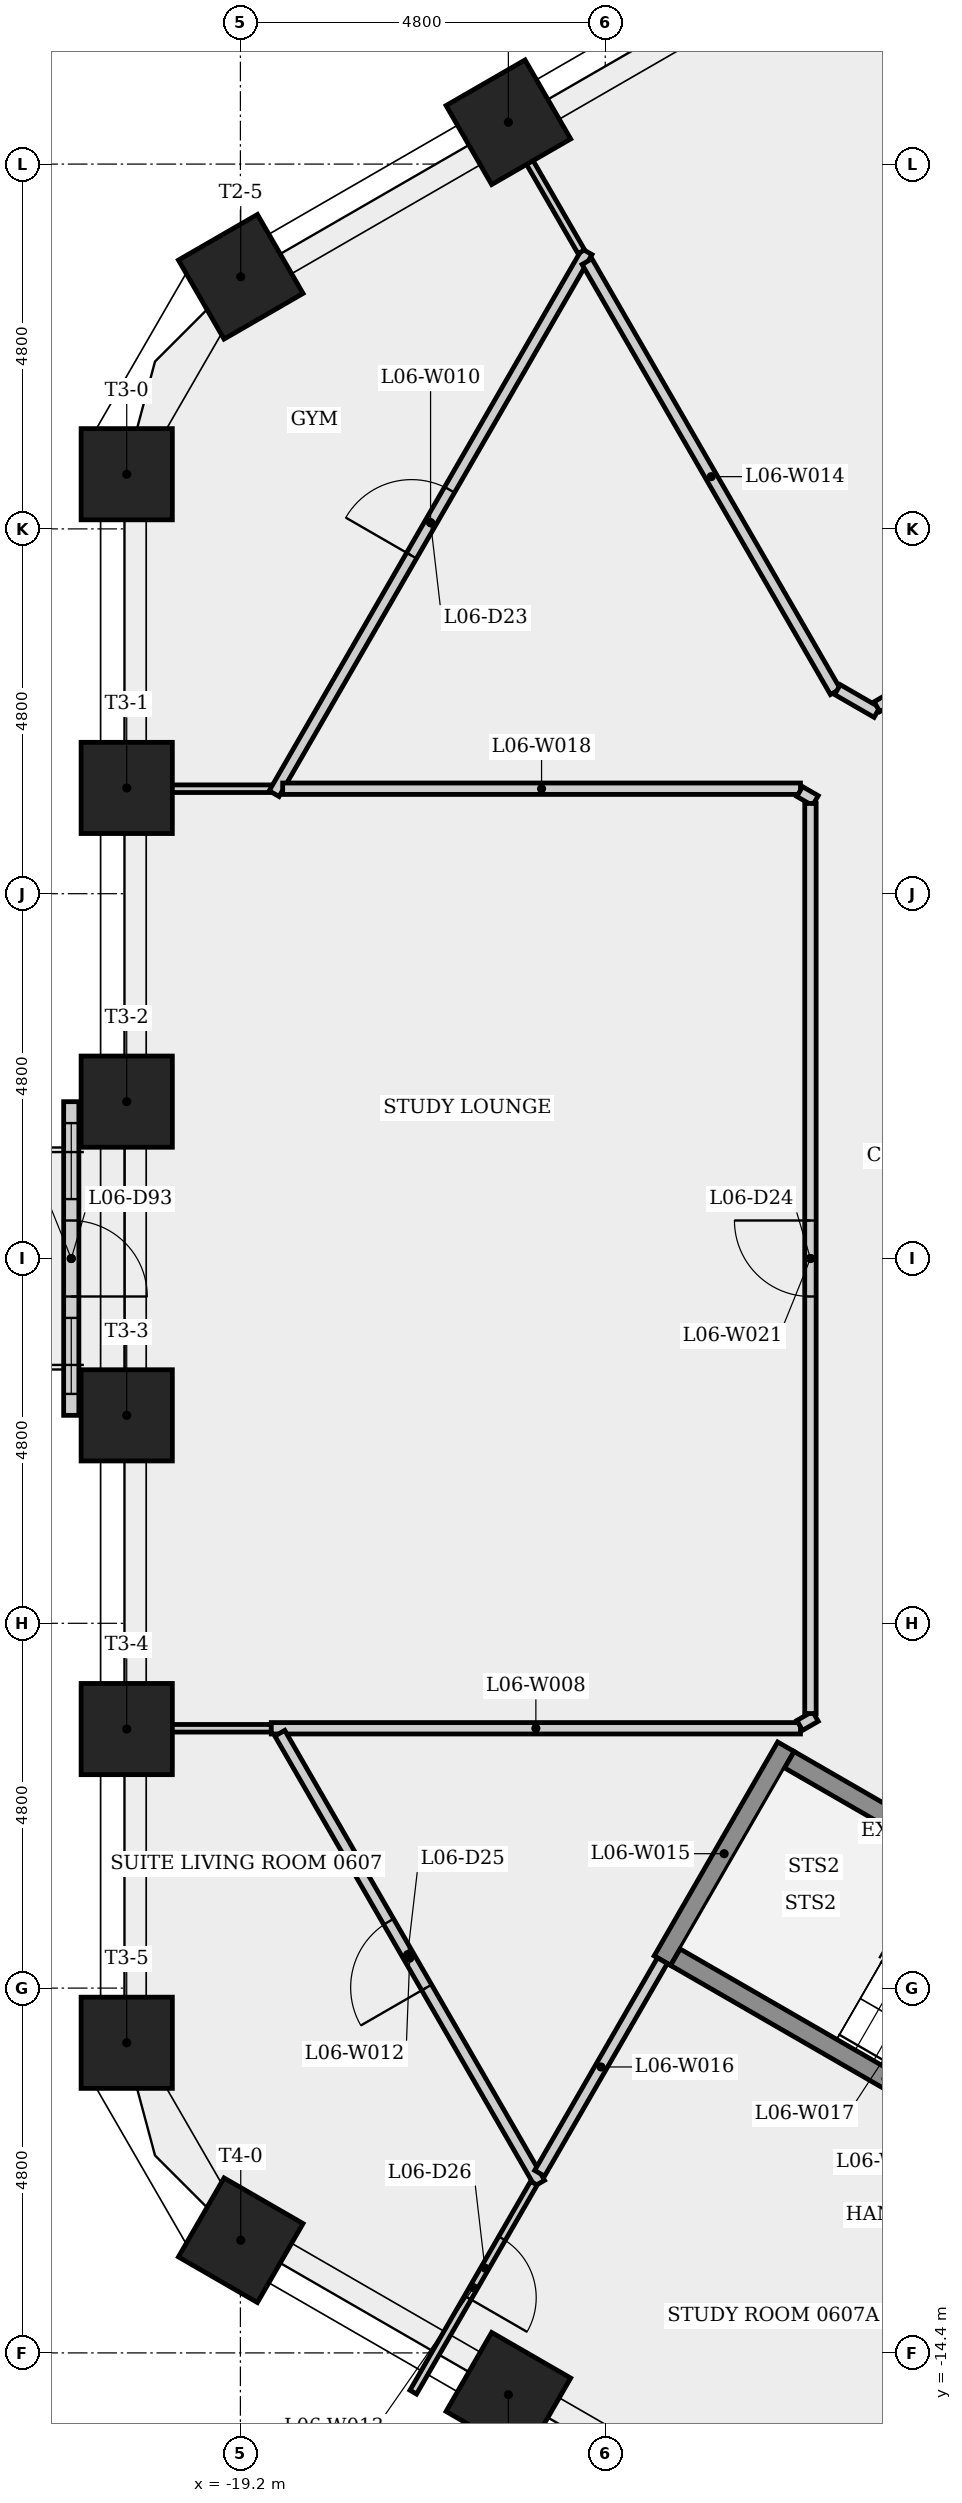
"""IFC4 building model, lengths in metres.
Left out: names, types, materials, properties, quantities, classifications, styles, units other than length and angle.
Written with IfcOpenShell. Run it as: python <this file> out.ifc"""

import sys

from ifc_helpers import new_model, si_unit, direction, frame, frame_2d, origin, origin_2d, place, context, subcontext, project, spatial, rectangle, extrude, element, fill, save


model = new_model("IFC4")
c1 = context("Model", 3, precision=1e-05, world=origin(), true_north=direction((0.0, 1.0)))
c2 = subcontext(c1, "Body", "Model", "MODEL_VIEW")
j1 = project(units=[si_unit("LENGTHUNIT", "METRE"), si_unit("PLANEANGLEUNIT", "RADIAN")], contexts=[c1])
p1 = place(None, origin())
s1 = spatial("IfcSite", under=j1, at=p1, CompositionType="ELEMENT")
p2 = place(p1, origin())
s2 = spatial("IfcBuilding", under=s1, at=p2, CompositionType="ELEMENT")
p3 = place(p2, frame((0.0, 0.0, 28.9)))
s3 = spatial("IfcBuildingStorey", under=s2, at=p3, CompositionType="ELEMENT", Elevation=28.9)
for number, where, z_axis, x_axis in (
    (1, (-15.674, 14.95, 0.0), (0.0, 0.0, 1.0), (-0.5, 0.866, 0.0)),
    (2, (-19.196, 12.917, 0.0), (0.0, 0.0, 1.0), (-0.5, 0.866, 0.0)),
    (3, (-20.696, 10.319, 0.0), (0.0, 0.0, 1.0), (-1.0, 0.0, 0.0)),
    (4, (-20.696, 6.192, 0.0), (0.0, 0.0, 1.0), (-1.0, 0.0, 0.0)),
    (5, (-20.696, 2.064, 0.0), (0.0, 0.0, 1.0), (-1.0, 0.0, 0.0)),
    (6, (-20.696, -2.064, 0.0), (0.0, 0.0, 1.0), (-1.0, 0.0, 0.0)),
    (7, (-20.696, -6.192, 0.0), (0.0, 0.0, 1.0), (-1.0, 0.0, 0.0)),
    (8, (-20.696, -10.319, 0.0), (0.0, 0.0, 1.0), (-1.0, 0.0, 0.0)),
    (9, (-19.196, -12.917, 0.0), (0.0, 0.0, 1.0), (-0.5, -0.866, 0.0)),
    (10, (-15.674, -14.95, 0.0), (0.0, 0.0, 1.0), (-0.5, -0.866, 0.0)),
):
    element("IfcColumn", number, at=place(p3, frame(where, z_axis=z_axis, x_axis=x_axis)), inside=s3, PredefinedType="COLUMN", context=c2, shape_type="SweptSolid", body=[
        extrude(rectangle(XDim=1.2, YDim=1.2, at=origin_2d()), origin(), (0.0, 0.0, 1.0), 3.4),
    ])
p4 = place(p3, frame((-21.425, 2.063, 0.0), z_axis=(0.0, 0.0, 1.0), x_axis=(0.0, -1.0, 0.0)))
e11 = element("IfcWall", 11, at=p4, inside=s3, PredefinedType="SOLIDWALL", context=c2, shape_type="SweptSolid", body=[
    extrude(rectangle(XDim=4.127, YDim=0.2, at=frame_2d((2.063, 0.0))), origin(), (0.0, 0.0, 1.0), 3.4),
])
p5 = place(p4, frame((1.563, 0.0, 0.0)))
e12 = element("IfcOpeningElement", 12, at=p5, cuts=e11, PredefinedType="OPENING", context=c2, shape_type="SweptSolid", body=[
    extrude(rectangle(XDim=1.0, YDim=2.4, at=frame_2d((0.5, 1.2))), frame((0.0, 0.11, 0.0), z_axis=(0.0, -1.0, 0.0), x_axis=(1.0, 0.0, 0.0)), (0.0, 0.0, 1.0), 0.22),
])
p6 = place(p4, frame((0.282, 0.0, 0.9)))
e13 = element("IfcOpeningElement", 13, at=p6, cuts=e11, PredefinedType="OPENING", context=c2, shape_type="SweptSolid", body=[
    extrude(rectangle(XDim=1.0, YDim=1.5, at=frame_2d((0.5, 0.75))), frame((0.0, 0.11, 0.0), z_axis=(0.0, -1.0, 0.0), x_axis=(1.0, 0.0, 0.0)), (0.0, 0.0, 1.0), 0.22),
])
p7 = place(p4, frame((2.845, 0.0, 0.9)))
e14 = element("IfcOpeningElement", 14, at=p7, cuts=e11, PredefinedType="OPENING", context=c2, shape_type="SweptSolid", body=[
    extrude(rectangle(XDim=1.0, YDim=1.5, at=frame_2d((0.5, 0.75))), frame((0.0, 0.11, 0.0), z_axis=(0.0, -1.0, 0.0), x_axis=(1.0, 0.0, 0.0)), (0.0, 0.0, 1.0), 0.22),
])
p8 = place(p3, frame((-18.794, -6.181, 0.0), z_axis=(0.0, 0.0, 1.0), x_axis=(-1.0, 0.0, 0.0)))
e15 = element("IfcWall", 15, at=p8, inside=s3, PredefinedType="PARTITIONING", context=c2, shape_type="SweptSolid", body=[
    extrude(rectangle(XDim=1.932, YDim=0.1, at=frame_2d((0.966, 0.0))), origin(), (0.0, 0.0, 1.0), 3.05),
])
p9 = place(p3, frame((-18.794, -6.181, 0.0), z_axis=(0.0, 0.0, 1.0), x_axis=(1.0, 0.0, 0.0)))
e16 = element("IfcWall", 16, at=p9, inside=s3, PredefinedType="PARTITIONING", context=c2, shape_type="SweptSolid", body=[
    extrude(rectangle(XDim=6.962, YDim=0.15, at=frame_2d((3.481, 0.0))), origin(), (0.0, 0.0, 1.0), 3.05),
])
p10 = place(p3, frame((-18.794, 6.181, 0.0), z_axis=(0.0, 0.0, 1.0), x_axis=(-1.0, 0.0, 0.0)))
e17 = element("IfcWall", 17, at=p10, inside=s3, PredefinedType="PARTITIONING", context=c2, shape_type="SweptSolid", body=[
    extrude(rectangle(XDim=1.932, YDim=0.1, at=frame_2d((0.966, 0.0))), origin(), (0.0, 0.0, 1.0), 3.05),
])
p11 = place(p3, frame((-18.756, 6.116, 0.0), z_axis=(0.0, 0.0, 1.0), x_axis=(0.500020193662, 0.866013744654, 0.0)))
e18 = element("IfcWall", 18, at=p11, inside=s3, PredefinedType="PARTITIONING", context=c2, shape_type="SweptSolid", body=[
    extrude(rectangle(XDim=8.234, YDim=0.15, at=frame_2d((4.117, 0.0))), origin(), (0.0, 0.0, 1.0), 3.05),
])
p12 = place(p11, frame((3.617, 0.0, 0.0)))
e19 = element("IfcOpeningElement", 19, at=p12, cuts=e18, PredefinedType="OPENING", context=c2, shape_type="SweptSolid", body=[
    extrude(rectangle(XDim=1.0, YDim=2.1, at=frame_2d((0.5, 1.05))), frame((0.0, 0.085, 0.0), z_axis=(0.0, -1.0, 0.0), x_axis=(1.0, 0.0, 0.0)), (0.0, 0.0, 1.0), 0.17),
])
p13 = place(p3, frame((-15.692, 14.94, 0.0), z_axis=(0.0, 0.0, 1.0), x_axis=(0.499953038101, -0.866052515552, 0.0)))
e20 = element("IfcWall", 20, at=p13, inside=s3, PredefinedType="PARTITIONING", context=c2, shape_type="SweptSolid", body=[
    extrude(rectangle(XDim=1.955, YDim=0.1, at=frame_2d((0.978, 0.0))), origin(), (0.0, 0.0, 1.0), 3.05),
])
p14 = place(p3, frame((-15.263, -12.167, 0.0), z_axis=(0.0, 0.0, 1.0), x_axis=(-0.500022320372, 0.866012516728, 0.0)))
e21 = element("IfcWall", 21, at=p14, inside=s3, PredefinedType="PARTITIONING", context=c2, shape_type="SweptSolid", body=[
    extrude(rectangle(XDim=6.836, YDim=0.15, at=frame_2d((3.418, 0.0))), origin(), (0.0, 0.0, 1.0), 3.05),
])
p15 = place(p14, frame((2.973, 0.0, 0.0)))
e22 = element("IfcOpeningElement", 22, at=p15, cuts=e21, PredefinedType="OPENING", context=c2, shape_type="SweptSolid", body=[
    extrude(rectangle(XDim=1.0, YDim=2.1, at=frame_2d((0.5, 1.05))), frame((0.0, 0.085, 0.0), z_axis=(0.0, -1.0, 0.0), x_axis=(1.0, 0.0, 0.0)), (0.0, 0.0, 1.0), 0.17),
])
p16 = place(p3, frame((-15.338, -12.167, 0.0), z_axis=(0.0, 0.0, 1.0), x_axis=(-0.500017526161, -0.866015284814, 0.0)))
e23 = element("IfcWall", 23, at=p16, inside=s3, PredefinedType="PARTITIONING", context=c2, shape_type="SweptSolid", body=[
    extrude(rectangle(XDim=3.175, YDim=0.1, at=frame_2d((1.588, 0.0))), origin(), (0.0, 0.0, 1.0), 3.05),
])
p17 = place(p16, frame((0.84, 0.0, 0.0)))
e24 = element("IfcOpeningElement", 24, at=p17, cuts=e23, PredefinedType="OPENING", context=c2, shape_type="SweptSolid", body=[
    extrude(rectangle(XDim=0.9, YDim=2.1, at=frame_2d((0.45, 1.05))), frame((0.0, 0.06, 0.0), z_axis=(0.0, -1.0, 0.0), x_axis=(1.0, 0.0, 0.0)), (0.0, 0.0, 1.0), 0.12),
])
p18 = place(p3, frame((-14.639, 13.117, 0.0), z_axis=(0.0, 0.0, 1.0), x_axis=(0.500000581714, -0.866025067932, 0.0)))
e25 = element("IfcWall", 25, at=p18, inside=s3, PredefinedType="PARTITIONING", context=c2, shape_type="SweptSolid", body=[
    extrude(rectangle(XDim=6.535, YDim=0.15, at=frame_2d((3.267, 0.0))), origin(), (0.0, 0.0, 1.0), 3.05),
])
p19 = place(p3, frame((-13.648, -9.239, 0.0), z_axis=(0.0, 0.0, 1.0), x_axis=(0.500017246033, 0.866015446554, 0.0)))
e26 = element("IfcWall", 26, at=p19, inside=s3, PredefinedType="SHEAR", context=c2, shape_type="SweptSolid", body=[
    extrude(rectangle(XDim=3.25, YDim=0.25, at=frame_2d((1.625, 0.0))), origin(), (0.0, 0.0, 1.0), 3.05),
])
p20 = place(p3, frame((-13.648, -9.239, 0.0), z_axis=(0.0, 0.0, 1.0), x_axis=(-0.500032073372, -0.866006885423, 0.0)))
e27 = element("IfcWall", 27, at=p20, inside=s3, PredefinedType="PARTITIONING", context=c2, shape_type="SweptSolid", body=[
    extrude(rectangle(XDim=3.231, YDim=0.15, at=frame_2d((1.615, 0.0))), origin(), (0.0, 0.0, 1.0), 3.05),
])
p21 = place(p3, frame((-11.977, -6.595, 0.0), z_axis=(0.0, 0.0, 1.0), x_axis=(0.866025499775, -0.499999833739, 0.0)))
e28 = element("IfcWall", 28, at=p21, inside=s3, PredefinedType="SHEAR", context=c2, shape_type="SweptSolid", body=[
    extrude(rectangle(XDim=6.4, YDim=0.25, at=frame_2d((3.2, 0.0))), origin(), (0.0, 0.0, 1.0), 3.05),
])
p22 = place(p21, frame((5.025, 0.0, 0.0)))
e29 = element("IfcOpeningElement", 29, at=p22, cuts=e28, PredefinedType="OPENING", context=c2, shape_type="SweptSolid", body=[
    extrude(rectangle(XDim=1.0, YDim=2.1, at=frame_2d((0.5, 1.05))), frame((0.0, 0.135, 0.0), z_axis=(0.0, -1.0, 0.0), x_axis=(1.0, 0.0, 0.0)), (0.0, 0.0, 1.0), 0.27),
])
p23 = place(p3, frame((-11.831, 6.181, 0.0), z_axis=(0.0, 0.0, 1.0), x_axis=(-1.0, 0.0, 0.0)))
e30 = element("IfcWall", 30, at=p23, inside=s3, PredefinedType="PARTITIONING", context=c2, shape_type="SweptSolid", body=[
    extrude(rectangle(XDim=6.812, YDim=0.15, at=frame_2d((3.406, 0.0))), origin(), (0.0, 0.0, 1.0), 3.05),
])
for number, where, z_axis, x_axis in (
    (31, (-11.841, -6.144, 0.0), (0.0, 0.0, 1.0), (0.866, 0.5, 0.0)),
    (32, (-11.635, 6.025, 0.0), (0.0, 0.0, 1.0), (-0.866, 0.5, 0.0)),
):
    element("IfcWall", number, at=place(p3, frame(where, z_axis=z_axis, x_axis=x_axis)), inside=s3, PredefinedType="PARTITIONING", context=c2, shape_type="SweptSolid", body=[
        extrude(rectangle(XDim=0.238, YDim=0.15, at=frame_2d((0.119, 0.0))), origin(), (0.0, 0.0, 1.0), 3.05),
    ])
p24 = place(p3, frame((-11.7, -5.987, 0.0), z_axis=(0.0, 0.0, 1.0), x_axis=(0.0, 1.0, 0.0)))
e33 = element("IfcWall", 33, at=p24, inside=s3, PredefinedType="PARTITIONING", context=c2, shape_type="SweptSolid", body=[
    extrude(rectangle(XDim=11.975, YDim=0.15, at=frame_2d((5.987, 0.0))), origin(), (0.0, 0.0, 1.0), 3.05),
])
p25 = place(p24, frame((5.487, 0.0, 0.0)))
e34 = element("IfcOpeningElement", 34, at=p25, cuts=e33, PredefinedType="OPENING", context=c2, shape_type="SweptSolid", body=[
    extrude(rectangle(XDim=1.0, YDim=2.1, at=frame_2d((0.5, 1.05))), frame((0.0, 0.085, 0.0), z_axis=(0.0, -1.0, 0.0), x_axis=(1.0, 0.0, 0.0)), (0.0, 0.0, 1.0), 0.17),
])
p26 = place(p3, frame((-11.344, 7.485, 0.0), z_axis=(0.0, 0.0, 1.0), x_axis=(0.866131372301, -0.499816412211, 0.0)))
e35 = element("IfcWall", 35, at=p26, inside=s3, PredefinedType="PARTITIONING", context=c2, shape_type="SweptSolid", body=[
    extrude(rectangle(XDim=0.6, YDim=0.15, at=frame_2d((0.3, 0.0))), origin(), (0.0, 0.0, 1.0), 3.05),
])
p27 = place(p3, frame((-10.825, 7.26, 0.0), z_axis=(0.0, 0.0, 1.0), x_axis=(0.866026819738, 0.499997547488, 0.0)))
e36 = element("IfcWall", 36, at=p27, inside=s3, PredefinedType="PARTITIONING", context=c2, shape_type="SweptSolid", body=[
    extrude(rectangle(XDim=11.882, YDim=0.15, at=frame_2d((5.941, 0.0))), origin(), (0.0, 0.0, 1.0), 3.05),
])
p28 = place(p27, frame((5.403, 0.0, 0.0)))
e37 = element("IfcOpeningElement", 37, at=p28, cuts=e36, PredefinedType="OPENING", context=c2, shape_type="SweptSolid", body=[
    extrude(rectangle(XDim=1.0, YDim=2.1, at=frame_2d((0.5, 1.05))), frame((0.0, 0.085, 0.0), z_axis=(0.0, -1.0, 0.0), x_axis=(1.0, 0.0, 0.0)), (0.0, 0.0, 1.0), 0.17),
])
p29 = place(p3, frame((-7.935, -12.393, 0.0), z_axis=(0.0, 0.0, 1.0), x_axis=(-0.866025499775, 0.499999833739, 0.0)))
e38 = element("IfcWall", 38, at=p29, inside=s3, PredefinedType="SHEAR", context=c2, shape_type="SweptSolid", body=[
    extrude(rectangle(XDim=6.4, YDim=0.25, at=frame_2d((3.2, 0.0))), origin(), (0.0, 0.0, 1.0), 3.05),
])
p30 = place(p5, origin())
e39 = element("IfcDoor", 39, at=p30, inside=s3, OperationType="SINGLE_SWING_RIGHT", PredefinedType="DOOR", context=c2, shape_type="SweptSolid", body=[
    extrude(rectangle(XDim=1.0, YDim=2.4, at=frame_2d((0.5, 1.2))), frame((0.0, 0.025, 0.0), z_axis=(0.0, -1.0, 0.0), x_axis=(1.0, 0.0, 0.0)), (0.0, 0.0, 1.0), 0.05),
])
fill(e12, e39)
p31 = place(p6, origin())
e40 = element("IfcWindow", 40, at=p31, inside=s3, PartitioningType="SINGLE_PANEL", PredefinedType="WINDOW", context=c2, shape_type="SweptSolid", body=[
    extrude(rectangle(XDim=1.0, YDim=1.5, at=frame_2d((0.5, 0.75))), frame((0.0, 0.03, 0.0), z_axis=(0.0, -1.0, 0.0), x_axis=(1.0, 0.0, 0.0)), (0.0, 0.0, 1.0), 0.06),
])
fill(e13, e40)
p32 = place(p7, origin())
e41 = element("IfcWindow", 41, at=p32, inside=s3, PartitioningType="SINGLE_PANEL", PredefinedType="WINDOW", context=c2, shape_type="SweptSolid", body=[
    extrude(rectangle(XDim=1.0, YDim=1.5, at=frame_2d((0.5, 0.75))), frame((0.0, 0.03, 0.0), z_axis=(0.0, -1.0, 0.0), x_axis=(1.0, 0.0, 0.0)), (0.0, 0.0, 1.0), 0.06),
])
fill(e14, e41)
p33 = place(p12, origin())
e42 = element("IfcDoor", 42, at=p33, inside=s3, OperationType="SINGLE_SWING_LEFT", PredefinedType="DOOR", context=c2, shape_type="SweptSolid", body=[
    extrude(rectangle(XDim=1.0, YDim=2.1, at=frame_2d((0.5, 1.05))), frame((0.0, 0.025, 0.0), z_axis=(0.0, -1.0, 0.0), x_axis=(1.0, 0.0, 0.0)), (0.0, 0.0, 1.0), 0.05),
])
fill(e19, e42)
p34 = place(p25, origin())
e43 = element("IfcDoor", 43, at=p34, inside=s3, OperationType="SINGLE_SWING_RIGHT", PredefinedType="DOOR", context=c2, shape_type="SweptSolid", body=[
    extrude(rectangle(XDim=1.0, YDim=2.1, at=frame_2d((0.5, 1.05))), frame((0.0, 0.025, 0.0), z_axis=(0.0, -1.0, 0.0), x_axis=(1.0, 0.0, 0.0)), (0.0, 0.0, 1.0), 0.05),
])
fill(e34, e43)
p35 = place(p15, origin())
e44 = element("IfcDoor", 44, at=p35, inside=s3, OperationType="SINGLE_SWING_LEFT", PredefinedType="DOOR", context=c2, shape_type="SweptSolid", body=[
    extrude(rectangle(XDim=1.0, YDim=2.1, at=frame_2d((0.5, 1.05))), frame((0.0, 0.025, 0.0), z_axis=(0.0, -1.0, 0.0), x_axis=(1.0, 0.0, 0.0)), (0.0, 0.0, 1.0), 0.05),
])
fill(e22, e44)
p36 = place(p17, origin())
e45 = element("IfcDoor", 45, at=p36, inside=s3, OperationType="SINGLE_SWING_RIGHT", PredefinedType="DOOR", context=c2, shape_type="SweptSolid", body=[
    extrude(rectangle(XDim=0.9, YDim=2.1, at=frame_2d((0.45, 1.05))), frame((0.0, 0.025, 0.0), z_axis=(0.0, -1.0, 0.0), x_axis=(1.0, 0.0, 0.0)), (0.0, 0.0, 1.0), 0.05),
])
fill(e24, e45)
save(model, sys.argv[1])
